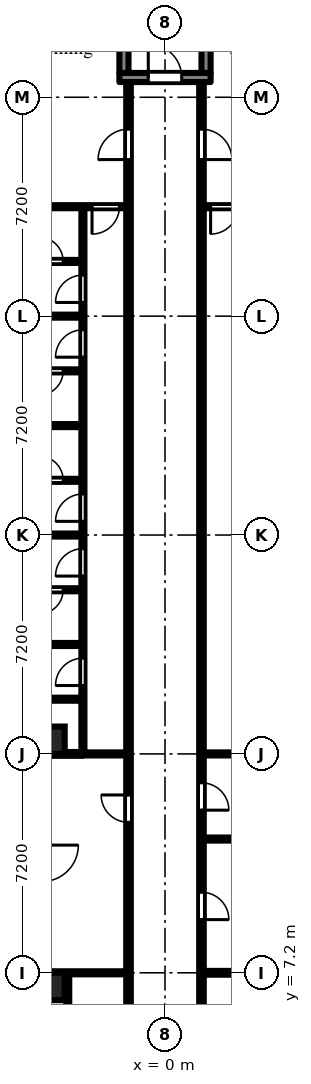
"""IFC4 building model, lengths in metres.
Left out: names, types, materials, properties, quantities, classifications, styles, units other than length and angle.
Written with IfcOpenShell. Run it as: python <this file> out.ifc"""

import sys

from ifc_helpers import new_model, si_unit, direction, frame, frame_2d, origin, origin_2d, place, context, subcontext, project, spatial, rectangle, extrude, element, fill, save


model = new_model("IFC4")
c1 = context("Model", 3, precision=1e-05, world=origin(), true_north=direction((0.0, 1.0)))
c2 = subcontext(c1, "Body", "Model", "MODEL_VIEW")
j1 = project(units=[si_unit("LENGTHUNIT", "METRE"), si_unit("PLANEANGLEUNIT", "RADIAN")], contexts=[c1])
p1 = place(None, origin())
s1 = spatial("IfcSite", under=j1, at=p1, CompositionType="ELEMENT")
p2 = place(p1, origin())
s2 = spatial("IfcBuilding", under=s1, at=p2, CompositionType="ELEMENT")
p3 = place(p2, frame((0.0, 0.0, 11.7)))
s3 = spatial("IfcBuildingStorey", under=s2, at=p3, CompositionType="ELEMENT", Elevation=11.7)
for number, where, z_axis, x_axis in (
    (1, (-3.75, 6.75, 0.0), (0.0, 0.0, 1.0), (1.0, 0.0, 0.0)),
    (2, (-3.75, 14.85, 0.0), (0.0, 0.0, 1.0), (1.0, 0.0, 0.0)),
):
    element("IfcColumn", number, at=place(p3, frame(where, z_axis=z_axis, x_axis=x_axis)), inside=s3, PredefinedType="COLUMN", context=c2, shape_type="SweptSolid", body=[
        extrude(rectangle(XDim=0.9, YDim=0.9, at=origin_2d()), origin(), (0.0, 0.0, 1.0), 3.0),
    ])
p4 = place(p3, frame((-1.5, 36.65, 0.0), z_axis=(0.0, 0.0, 1.0), x_axis=(1.0, 0.0, 0.0)))
e3 = element("IfcWall", 3, at=p4, inside=s3, PredefinedType="SHEAR", context=c2, shape_type="SweptSolid", body=[
    extrude(rectangle(XDim=3.0, YDim=0.3, at=frame_2d((1.5, 0.0))), origin(), (0.0, 0.0, 1.0), 2.575),
])
p5 = place(p4, frame((0.95, 0.0, 0.0)))
e4 = element("IfcOpeningElement", 4, at=p5, cuts=e3, PredefinedType="OPENING", context=c2, shape_type="SweptSolid", body=[
    extrude(rectangle(XDim=1.1, YDim=2.1, at=frame_2d((0.55, 1.05))), frame((0.0, 0.16, 0.0), z_axis=(0.0, -1.0, 0.0), x_axis=(1.0, 0.0, 0.0)), (0.0, 0.0, 1.0), 0.32),
])
for number, where, z_axis, x_axis in (
    (5, (-1.35, 36.8, 0.0), (0.0, 0.0, 1.0), (0.0, 1.0, 0.0)),
    (6, (1.35, 36.8, 0.0), (0.0, 0.0, 1.0), (0.0, 1.0, 0.0)),
):
    element("IfcWall", number, at=place(p3, frame(where, z_axis=z_axis, x_axis=x_axis)), inside=s3, PredefinedType="SHEAR", context=c2, shape_type="SweptSolid", body=[
        extrude(rectangle(XDim=5.8, YDim=0.3, at=frame_2d((2.9, 0.0))), origin(), (0.0, 0.0, 1.0), 2.575),
    ])
for number, where, z_axis, x_axis in (
    (7, (-6.9, 18.0, 0.0), (0.0, 0.0, 1.0), (1.0, 0.0, 0.0)),
    (8, (-6.9, 21.6, 0.0), (0.0, 0.0, 1.0), (1.0, 0.0, 0.0)),
    (9, (-6.9, 25.2, 0.0), (0.0, 0.0, 1.0), (1.0, 0.0, 0.0)),
    (10, (-6.9, 28.8, 0.0), (0.0, 0.0, 1.0), (1.0, 0.0, 0.0)),
):
    element("IfcWall", number, at=place(p3, frame(where, z_axis=z_axis, x_axis=x_axis)), inside=s3, PredefinedType="PARTITIONING", context=c2, shape_type="SweptSolid", body=[
        extrude(rectangle(XDim=4.15, YDim=0.1, at=frame_2d((2.075, 0.0))), origin(), (0.0, 0.0, 1.0), 2.575),
    ])
p6 = place(p3, frame((-6.9, 32.4, 0.0), z_axis=(0.0, 0.0, 1.0), x_axis=(1.0, 0.0, 0.0)))
e11 = element("IfcWall", 11, at=p6, inside=s3, PredefinedType="PARTITIONING", context=c2, shape_type="SweptSolid", body=[
    extrude(rectangle(XDim=5.625, YDim=0.1, at=frame_2d((2.812, 0.0))), origin(), (0.0, 0.0, 1.0), 2.575),
])
p7 = place(p6, frame((4.5, 0.0, 0.0)))
e12 = element("IfcOpeningElement", 12, at=p7, cuts=e11, PredefinedType="OPENING", context=c2, shape_type="SweptSolid", body=[
    extrude(rectangle(XDim=0.9, YDim=2.1, at=frame_2d((0.45, 1.05))), frame((0.0, 0.06, 0.0), z_axis=(0.0, -1.0, 0.0), x_axis=(1.0, 0.0, 0.0)), (0.0, 0.0, 1.0), 0.12),
])
p8 = place(p3, frame((-4.75, 16.2, 0.0), z_axis=(0.0, 0.0, 1.0), x_axis=(1.0, 0.0, 0.0)))
e13 = element("IfcWall", 13, at=p8, inside=s3, PredefinedType="PARTITIONING", context=c2, shape_type="SweptSolid", body=[
    extrude(rectangle(XDim=2.0, YDim=0.1, at=frame_2d((1.0, 0.0))), origin(), (0.0, 0.0, 1.0), 2.575),
])
p9 = place(p3, frame((-4.75, 19.8, 0.0), z_axis=(0.0, 0.0, 1.0), x_axis=(1.0, 0.0, 0.0)))
e14 = element("IfcWall", 14, at=p9, inside=s3, PredefinedType="PARTITIONING", context=c2, shape_type="SweptSolid", body=[
    extrude(rectangle(XDim=2.0, YDim=0.1, at=frame_2d((1.0, 0.0))), origin(), (0.0, 0.0, 1.0), 2.575),
])
p10 = place(p9, frame((0.6, 0.0, 0.0)))
e15 = element("IfcOpeningElement", 15, at=p10, cuts=e14, PredefinedType="OPENING", context=c2, shape_type="SweptSolid", body=[
    extrude(rectangle(XDim=0.8, YDim=2.1, at=frame_2d((0.4, 1.05))), frame((0.0, 0.06, 0.0), z_axis=(0.0, -1.0, 0.0), x_axis=(1.0, 0.0, 0.0)), (0.0, 0.0, 1.0), 0.12),
])
p11 = place(p3, frame((-4.75, 23.4, 0.0), z_axis=(0.0, 0.0, 1.0), x_axis=(1.0, 0.0, 0.0)))
e16 = element("IfcWall", 16, at=p11, inside=s3, PredefinedType="PARTITIONING", context=c2, shape_type="SweptSolid", body=[
    extrude(rectangle(XDim=2.0, YDim=0.1, at=frame_2d((1.0, 0.0))), origin(), (0.0, 0.0, 1.0), 2.575),
])
p12 = place(p11, frame((0.6, 0.0, 0.0)))
e17 = element("IfcOpeningElement", 17, at=p12, cuts=e16, PredefinedType="OPENING", context=c2, shape_type="SweptSolid", body=[
    extrude(rectangle(XDim=0.8, YDim=2.1, at=frame_2d((0.4, 1.05))), frame((0.0, 0.06, 0.0), z_axis=(0.0, -1.0, 0.0), x_axis=(1.0, 0.0, 0.0)), (0.0, 0.0, 1.0), 0.12),
])
p13 = place(p3, frame((-4.75, 27.0, 0.0), z_axis=(0.0, 0.0, 1.0), x_axis=(1.0, 0.0, 0.0)))
e18 = element("IfcWall", 18, at=p13, inside=s3, PredefinedType="PARTITIONING", context=c2, shape_type="SweptSolid", body=[
    extrude(rectangle(XDim=2.0, YDim=0.1, at=frame_2d((1.0, 0.0))), origin(), (0.0, 0.0, 1.0), 2.575),
])
p14 = place(p13, frame((0.6, 0.0, 0.0)))
e19 = element("IfcOpeningElement", 19, at=p14, cuts=e18, PredefinedType="OPENING", context=c2, shape_type="SweptSolid", body=[
    extrude(rectangle(XDim=0.8, YDim=2.1, at=frame_2d((0.4, 1.05))), frame((0.0, 0.06, 0.0), z_axis=(0.0, -1.0, 0.0), x_axis=(1.0, 0.0, 0.0)), (0.0, 0.0, 1.0), 0.12),
])
p15 = place(p3, frame((-4.75, 30.6, 0.0), z_axis=(0.0, 0.0, 1.0), x_axis=(1.0, 0.0, 0.0)))
e20 = element("IfcWall", 20, at=p15, inside=s3, PredefinedType="PARTITIONING", context=c2, shape_type="SweptSolid", body=[
    extrude(rectangle(XDim=2.0, YDim=0.1, at=frame_2d((1.0, 0.0))), origin(), (0.0, 0.0, 1.0), 2.575),
])
p16 = place(p15, frame((0.6, 0.0, 0.0)))
e21 = element("IfcOpeningElement", 21, at=p16, cuts=e20, PredefinedType="OPENING", context=c2, shape_type="SweptSolid", body=[
    extrude(rectangle(XDim=0.8, YDim=2.1, at=frame_2d((0.4, 1.05))), frame((0.0, 0.06, 0.0), z_axis=(0.0, -1.0, 0.0), x_axis=(1.0, 0.0, 0.0)), (0.0, 0.0, 1.0), 0.12),
])
p17 = place(p3, frame((-3.9, 7.2, 0.0), z_axis=(0.0, 0.0, 1.0), x_axis=(1.0, 0.0, 0.0)))
e22 = element("IfcWall", 22, at=p17, inside=s3, PredefinedType="PARTITIONING", context=c2, shape_type="SweptSolid", body=[
    extrude(rectangle(XDim=2.625, YDim=0.1, at=frame_2d((1.312, 0.0))), origin(), (0.0, 0.0, 1.0), 2.575),
])
p18 = place(p3, frame((-3.9, 14.4, 0.0), z_axis=(0.0, 0.0, 1.0), x_axis=(1.0, 0.0, 0.0)))
e23 = element("IfcWall", 23, at=p18, inside=s3, PredefinedType="PARTITIONING", context=c2, shape_type="SweptSolid", body=[
    extrude(rectangle(XDim=1.2, YDim=0.125, at=frame_2d((0.6, 0.0))), origin(), (0.0, 0.0, 1.0), 2.575),
])
p19 = place(p3, frame((-3.2, 1.275, 0.0), z_axis=(0.0, 0.0, 1.0), x_axis=(0.0, 1.0, 0.0)))
e24 = element("IfcWall", 24, at=p19, inside=s3, PredefinedType="PARTITIONING", context=c2, shape_type="SweptSolid", body=[
    extrude(rectangle(XDim=5.875, YDim=0.1, at=frame_2d((2.938, 0.0))), origin(), (0.0, 0.0, 1.0), 2.575),
])
p20 = place(p3, frame((-2.7, 14.462, 0.0), z_axis=(0.0, 0.0, 1.0), x_axis=(0.0, 1.0, 0.0)))
e25 = element("IfcWall", 25, at=p20, inside=s3, PredefinedType="PARTITIONING", context=c2, shape_type="SweptSolid", body=[
    extrude(rectangle(XDim=17.888, YDim=0.1, at=frame_2d((8.944, 0.0))), origin(), (0.0, 0.0, 1.0), 2.575),
])
p21 = place(p20, frame((2.188, 0.0, 0.0)))
e26 = element("IfcOpeningElement", 26, at=p21, cuts=e25, PredefinedType="OPENING", context=c2, shape_type="SweptSolid", body=[
    extrude(rectangle(XDim=0.9, YDim=2.1, at=frame_2d((0.45, 1.05))), frame((0.0, 0.06, 0.0), z_axis=(0.0, -1.0, 0.0), x_axis=(1.0, 0.0, 0.0)), (0.0, 0.0, 1.0), 0.12),
])
p22 = place(p20, frame((5.788, 0.0, 0.0)))
e27 = element("IfcOpeningElement", 27, at=p22, cuts=e25, PredefinedType="OPENING", context=c2, shape_type="SweptSolid", body=[
    extrude(rectangle(XDim=0.9, YDim=2.1, at=frame_2d((0.45, 1.05))), frame((0.0, 0.06, 0.0), z_axis=(0.0, -1.0, 0.0), x_axis=(1.0, 0.0, 0.0)), (0.0, 0.0, 1.0), 0.12),
])
p23 = place(p20, frame((7.587, 0.0, 0.0)))
e28 = element("IfcOpeningElement", 28, at=p23, cuts=e25, PredefinedType="OPENING", context=c2, shape_type="SweptSolid", body=[
    extrude(rectangle(XDim=0.9, YDim=2.1, at=frame_2d((0.45, 1.05))), frame((0.0, 0.06, 0.0), z_axis=(0.0, -1.0, 0.0), x_axis=(1.0, 0.0, 0.0)), (0.0, 0.0, 1.0), 0.12),
])
p24 = place(p20, frame((12.988, 0.0, 0.0)))
e29 = element("IfcOpeningElement", 29, at=p24, cuts=e25, PredefinedType="OPENING", context=c2, shape_type="SweptSolid", body=[
    extrude(rectangle(XDim=0.9, YDim=2.1, at=frame_2d((0.45, 1.05))), frame((0.0, 0.06, 0.0), z_axis=(0.0, -1.0, 0.0), x_axis=(1.0, 0.0, 0.0)), (0.0, 0.0, 1.0), 0.12),
])
p25 = place(p20, frame((14.788, 0.0, 0.0)))
e30 = element("IfcOpeningElement", 30, at=p25, cuts=e25, PredefinedType="OPENING", context=c2, shape_type="SweptSolid", body=[
    extrude(rectangle(XDim=0.9, YDim=2.1, at=frame_2d((0.45, 1.05))), frame((0.0, 0.06, 0.0), z_axis=(0.0, -1.0, 0.0), x_axis=(1.0, 0.0, 0.0)), (0.0, 0.0, 1.0), 0.12),
])
p26 = place(p3, frame((-2.7, 14.4, 0.0), z_axis=(0.0, 0.0, 1.0), x_axis=(1.0, 0.0, 0.0)))
e31 = element("IfcWall", 31, at=p26, inside=s3, PredefinedType="PARTITIONING", context=c2, shape_type="SweptSolid", body=[
    extrude(rectangle(XDim=1.425, YDim=0.1, at=frame_2d((0.712, 0.0))), origin(), (0.0, 0.0, 1.0), 2.575),
])
p27 = place(p3, frame((-1.2, 1.125, 0.0), z_axis=(0.0, 0.0, 1.0), x_axis=(0.0, 1.0, 0.0)))
e32 = element("IfcWall", 32, at=p27, inside=s3, PredefinedType="PARTITIONING", context=c2, shape_type="SweptSolid", body=[
    extrude(rectangle(XDim=35.375, YDim=0.15, at=frame_2d((17.688, 0.0))), origin(), (0.0, 0.0, 1.0), 2.575),
])
p28 = place(p27, frame((2.625, 0.0, 0.0)))
e33 = element("IfcOpeningElement", 33, at=p28, cuts=e32, PredefinedType="OPENING", context=c2, shape_type="SweptSolid", body=[
    extrude(rectangle(XDim=0.9, YDim=2.1, at=frame_2d((0.45, 1.05))), frame((0.0, 0.085, 0.0), z_axis=(0.0, -1.0, 0.0), x_axis=(1.0, 0.0, 0.0)), (0.0, 0.0, 1.0), 0.17),
])
p29 = place(p27, frame((11.025, 0.0, 0.0)))
e34 = element("IfcOpeningElement", 34, at=p29, cuts=e32, PredefinedType="OPENING", context=c2, shape_type="SweptSolid", body=[
    extrude(rectangle(XDim=0.9, YDim=2.1, at=frame_2d((0.45, 1.05))), frame((0.0, 0.085, 0.0), z_axis=(0.0, -1.0, 0.0), x_axis=(1.0, 0.0, 0.0)), (0.0, 0.0, 1.0), 0.17),
])
p30 = place(p27, frame((32.825, 0.0, 0.0)))
e35 = element("IfcOpeningElement", 35, at=p30, cuts=e32, PredefinedType="OPENING", context=c2, shape_type="SweptSolid", body=[
    extrude(rectangle(XDim=1.0, YDim=2.1, at=frame_2d((0.5, 1.05))), frame((0.0, 0.085, 0.0), z_axis=(0.0, -1.0, 0.0), x_axis=(1.0, 0.0, 0.0)), (0.0, 0.0, 1.0), 0.17),
])
p31 = place(p3, frame((1.2, 1.125, 0.0), z_axis=(0.0, 0.0, 1.0), x_axis=(0.0, 1.0, 0.0)))
e36 = element("IfcWall", 36, at=p31, inside=s3, PredefinedType="PARTITIONING", context=c2, shape_type="SweptSolid", body=[
    extrude(rectangle(XDim=35.375, YDim=0.15, at=frame_2d((17.688, 0.0))), origin(), (0.0, 0.0, 1.0), 2.575),
])
p32 = place(p31, frame((2.625, 0.0, 0.0)))
e37 = element("IfcOpeningElement", 37, at=p32, cuts=e36, PredefinedType="OPENING", context=c2, shape_type="SweptSolid", body=[
    extrude(rectangle(XDim=0.9, YDim=2.1, at=frame_2d((0.45, 1.05))), frame((0.0, 0.085, 0.0), z_axis=(0.0, -1.0, 0.0), x_axis=(1.0, 0.0, 0.0)), (0.0, 0.0, 1.0), 0.17),
])
p33 = place(p31, frame((11.425, 0.0, 0.0)))
e38 = element("IfcOpeningElement", 38, at=p33, cuts=e36, PredefinedType="OPENING", context=c2, shape_type="SweptSolid", body=[
    extrude(rectangle(XDim=0.9, YDim=2.1, at=frame_2d((0.45, 1.05))), frame((0.0, 0.085, 0.0), z_axis=(0.0, -1.0, 0.0), x_axis=(1.0, 0.0, 0.0)), (0.0, 0.0, 1.0), 0.17),
])
p34 = place(p31, frame((7.825, 0.0, 0.0)))
e39 = element("IfcOpeningElement", 39, at=p34, cuts=e36, PredefinedType="OPENING", context=c2, shape_type="SweptSolid", body=[
    extrude(rectangle(XDim=0.9, YDim=2.1, at=frame_2d((0.45, 1.05))), frame((0.0, 0.085, 0.0), z_axis=(0.0, -1.0, 0.0), x_axis=(1.0, 0.0, 0.0)), (0.0, 0.0, 1.0), 0.17),
])
p35 = place(p31, frame((32.825, 0.0, 0.0)))
e40 = element("IfcOpeningElement", 40, at=p35, cuts=e36, PredefinedType="OPENING", context=c2, shape_type="SweptSolid", body=[
    extrude(rectangle(XDim=1.0, YDim=2.1, at=frame_2d((0.5, 1.05))), frame((0.0, 0.085, 0.0), z_axis=(0.0, -1.0, 0.0), x_axis=(1.0, 0.0, 0.0)), (0.0, 0.0, 1.0), 0.17),
])
p36 = place(p3, frame((1.275, 7.2, 0.0), z_axis=(0.0, 0.0, 1.0), x_axis=(1.0, 0.0, 0.0)))
e41 = element("IfcWall", 41, at=p36, inside=s3, PredefinedType="PARTITIONING", context=c2, shape_type="SweptSolid", body=[
    extrude(rectangle(XDim=2.625, YDim=0.125, at=frame_2d((1.312, 0.0))), origin(), (0.0, 0.0, 1.0), 2.575),
])
p37 = place(p3, frame((1.275, 11.6, 0.0), z_axis=(0.0, 0.0, 1.0), x_axis=(1.0, 0.0, 0.0)))
e42 = element("IfcWall", 42, at=p37, inside=s3, PredefinedType="PARTITIONING", context=c2, shape_type="SweptSolid", body=[
    extrude(rectangle(XDim=2.625, YDim=0.1, at=frame_2d((1.312, 0.0))), origin(), (0.0, 0.0, 1.0), 2.575),
])
p38 = place(p3, frame((1.275, 14.4, 0.0), z_axis=(0.0, 0.0, 1.0), x_axis=(1.0, 0.0, 0.0)))
e43 = element("IfcWall", 43, at=p38, inside=s3, PredefinedType="PARTITIONING", context=c2, shape_type="SweptSolid", body=[
    extrude(rectangle(XDim=1.425, YDim=0.1, at=frame_2d((0.712, 0.0))), origin(), (0.0, 0.0, 1.0), 2.575),
])
p39 = place(p3, frame((1.275, 32.4, 0.0), z_axis=(0.0, 0.0, 1.0), x_axis=(1.0, 0.0, 0.0)))
e44 = element("IfcWall", 44, at=p39, inside=s3, PredefinedType="PARTITIONING", context=c2, shape_type="SweptSolid", body=[
    extrude(rectangle(XDim=5.625, YDim=0.1, at=frame_2d((2.812, 0.0))), origin(), (0.0, 0.0, 1.0), 2.575),
])
p40 = place(p39, frame((0.225, 0.0, 0.0)))
e45 = element("IfcOpeningElement", 45, at=p40, cuts=e44, PredefinedType="OPENING", context=c2, shape_type="SweptSolid", body=[
    extrude(rectangle(XDim=0.9, YDim=2.1, at=frame_2d((0.45, 1.05))), frame((0.0, 0.06, 0.0), z_axis=(0.0, -1.0, 0.0), x_axis=(1.0, 0.0, 0.0)), (0.0, 0.0, 1.0), 0.12),
])
p41 = place(p5, origin())
e46 = element("IfcDoor", 46, at=p41, inside=s3, OperationType="SINGLE_SWING_LEFT", PredefinedType="DOOR", context=c2, shape_type="SweptSolid", body=[
    extrude(rectangle(XDim=1.1, YDim=2.1, at=frame_2d((0.55, 1.05))), frame((0.0, 0.025, 0.0), z_axis=(0.0, -1.0, 0.0), x_axis=(1.0, 0.0, 0.0)), (0.0, 0.0, 1.0), 0.05),
])
fill(e4, e46)
p42 = place(p29, origin())
e47 = element("IfcDoor", 47, at=p42, inside=s3, OperationType="SINGLE_SWING_RIGHT", PredefinedType="DOOR", context=c2, shape_type="SweptSolid", body=[
    extrude(rectangle(XDim=0.9, YDim=2.1, at=frame_2d((0.45, 1.05))), frame((0.0, 0.025, 0.0), z_axis=(0.0, -1.0, 0.0), x_axis=(1.0, 0.0, 0.0)), (0.0, 0.0, 1.0), 0.05),
])
fill(e34, e47)
p43 = place(p30, origin())
e48 = element("IfcDoor", 48, at=p43, inside=s3, OperationType="SINGLE_SWING_LEFT", PredefinedType="DOOR", context=c2, shape_type="SweptSolid", body=[
    extrude(rectangle(XDim=1.0, YDim=2.1, at=frame_2d((0.5, 1.05))), frame((0.0, 0.025, 0.0), z_axis=(0.0, -1.0, 0.0), x_axis=(1.0, 0.0, 0.0)), (0.0, 0.0, 1.0), 0.05),
])
fill(e35, e48)
p44 = place(p21, origin())
e49 = element("IfcDoor", 49, at=p44, inside=s3, OperationType="SINGLE_SWING_LEFT", PredefinedType="DOOR", context=c2, shape_type="SweptSolid", body=[
    extrude(rectangle(XDim=0.9, YDim=2.1, at=frame_2d((0.45, 1.05))), frame((0.0, 0.025, 0.0), z_axis=(0.0, -1.0, 0.0), x_axis=(1.0, 0.0, 0.0)), (0.0, 0.0, 1.0), 0.05),
])
fill(e26, e49)
p45 = place(p22, origin())
e50 = element("IfcDoor", 50, at=p45, inside=s3, OperationType="SINGLE_SWING_LEFT", PredefinedType="DOOR", context=c2, shape_type="SweptSolid", body=[
    extrude(rectangle(XDim=0.9, YDim=2.1, at=frame_2d((0.45, 1.05))), frame((0.0, 0.025, 0.0), z_axis=(0.0, -1.0, 0.0), x_axis=(1.0, 0.0, 0.0)), (0.0, 0.0, 1.0), 0.05),
])
fill(e27, e50)
p46 = place(p23, origin())
e51 = element("IfcDoor", 51, at=p46, inside=s3, OperationType="SINGLE_SWING_LEFT", PredefinedType="DOOR", context=c2, shape_type="SweptSolid", body=[
    extrude(rectangle(XDim=0.9, YDim=2.1, at=frame_2d((0.45, 1.05))), frame((0.0, 0.025, 0.0), z_axis=(0.0, -1.0, 0.0), x_axis=(1.0, 0.0, 0.0)), (0.0, 0.0, 1.0), 0.05),
])
fill(e28, e51)
p47 = place(p24, origin())
e52 = element("IfcDoor", 52, at=p47, inside=s3, OperationType="SINGLE_SWING_LEFT", PredefinedType="DOOR", context=c2, shape_type="SweptSolid", body=[
    extrude(rectangle(XDim=0.9, YDim=2.1, at=frame_2d((0.45, 1.05))), frame((0.0, 0.025, 0.0), z_axis=(0.0, -1.0, 0.0), x_axis=(1.0, 0.0, 0.0)), (0.0, 0.0, 1.0), 0.05),
])
fill(e29, e52)
p48 = place(p25, origin())
e53 = element("IfcDoor", 53, at=p48, inside=s3, OperationType="SINGLE_SWING_LEFT", PredefinedType="DOOR", context=c2, shape_type="SweptSolid", body=[
    extrude(rectangle(XDim=0.9, YDim=2.1, at=frame_2d((0.45, 1.05))), frame((0.0, 0.025, 0.0), z_axis=(0.0, -1.0, 0.0), x_axis=(1.0, 0.0, 0.0)), (0.0, 0.0, 1.0), 0.05),
])
fill(e30, e53)
p49 = place(p7, frame((0.9, 0.0, 0.0), z_axis=(0.0, 0.0, 1.0), x_axis=(-1.0, 0.0, 0.0)))
e54 = element("IfcDoor", 54, at=p49, inside=s3, OperationType="SINGLE_SWING_RIGHT", PredefinedType="DOOR", context=c2, shape_type="SweptSolid", body=[
    extrude(rectangle(XDim=0.9, YDim=2.1, at=frame_2d((0.45, 1.05))), frame((0.0, 0.025, 0.0), z_axis=(0.0, -1.0, 0.0), x_axis=(1.0, 0.0, 0.0)), (0.0, 0.0, 1.0), 0.05),
])
fill(e12, e54)
p50 = place(p10, frame((0.8, 0.0, 0.0), z_axis=(0.0, 0.0, 1.0), x_axis=(-1.0, 0.0, 0.0)))
e55 = element("IfcDoor", 55, at=p50, inside=s3, OperationType="SINGLE_SWING_RIGHT", PredefinedType="DOOR", context=c2, shape_type="SweptSolid", body=[
    extrude(rectangle(XDim=0.8, YDim=2.1, at=frame_2d((0.4, 1.05))), frame((0.0, 0.025, 0.0), z_axis=(0.0, -1.0, 0.0), x_axis=(1.0, 0.0, 0.0)), (0.0, 0.0, 1.0), 0.05),
])
fill(e15, e55)
p51 = place(p12, origin())
e56 = element("IfcDoor", 56, at=p51, inside=s3, OperationType="SINGLE_SWING_LEFT", PredefinedType="DOOR", context=c2, shape_type="SweptSolid", body=[
    extrude(rectangle(XDim=0.8, YDim=2.1, at=frame_2d((0.4, 1.05))), frame((0.0, 0.025, 0.0), z_axis=(0.0, -1.0, 0.0), x_axis=(1.0, 0.0, 0.0)), (0.0, 0.0, 1.0), 0.05),
])
fill(e17, e56)
p52 = place(p14, frame((0.8, 0.0, 0.0), z_axis=(0.0, 0.0, 1.0), x_axis=(-1.0, 0.0, 0.0)))
e57 = element("IfcDoor", 57, at=p52, inside=s3, OperationType="SINGLE_SWING_RIGHT", PredefinedType="DOOR", context=c2, shape_type="SweptSolid", body=[
    extrude(rectangle(XDim=0.8, YDim=2.1, at=frame_2d((0.4, 1.05))), frame((0.0, 0.025, 0.0), z_axis=(0.0, -1.0, 0.0), x_axis=(1.0, 0.0, 0.0)), (0.0, 0.0, 1.0), 0.05),
])
fill(e19, e57)
p53 = place(p16, origin())
e58 = element("IfcDoor", 58, at=p53, inside=s3, OperationType="SINGLE_SWING_LEFT", PredefinedType="DOOR", context=c2, shape_type="SweptSolid", body=[
    extrude(rectangle(XDim=0.8, YDim=2.1, at=frame_2d((0.4, 1.05))), frame((0.0, 0.025, 0.0), z_axis=(0.0, -1.0, 0.0), x_axis=(1.0, 0.0, 0.0)), (0.0, 0.0, 1.0), 0.05),
])
fill(e21, e58)
p54 = place(p33, frame((0.9, 0.0, 0.0), z_axis=(0.0, 0.0, 1.0), x_axis=(-1.0, 0.0, 0.0)))
e59 = element("IfcDoor", 59, at=p54, inside=s3, OperationType="SINGLE_SWING_RIGHT", PredefinedType="DOOR", context=c2, shape_type="SweptSolid", body=[
    extrude(rectangle(XDim=0.9, YDim=2.1, at=frame_2d((0.45, 1.05))), frame((0.0, 0.025, 0.0), z_axis=(0.0, -1.0, 0.0), x_axis=(1.0, 0.0, 0.0)), (0.0, 0.0, 1.0), 0.05),
])
fill(e38, e59)
p55 = place(p34, frame((0.9, 0.0, 0.0), z_axis=(0.0, 0.0, 1.0), x_axis=(-1.0, 0.0, 0.0)))
e60 = element("IfcDoor", 60, at=p55, inside=s3, OperationType="SINGLE_SWING_RIGHT", PredefinedType="DOOR", context=c2, shape_type="SweptSolid", body=[
    extrude(rectangle(XDim=0.9, YDim=2.1, at=frame_2d((0.45, 1.05))), frame((0.0, 0.025, 0.0), z_axis=(0.0, -1.0, 0.0), x_axis=(1.0, 0.0, 0.0)), (0.0, 0.0, 1.0), 0.05),
])
fill(e39, e60)
p56 = place(p35, frame((1.0, 0.0, 0.0), z_axis=(0.0, 0.0, 1.0), x_axis=(-1.0, 0.0, 0.0)))
e61 = element("IfcDoor", 61, at=p56, inside=s3, OperationType="SINGLE_SWING_RIGHT", PredefinedType="DOOR", context=c2, shape_type="SweptSolid", body=[
    extrude(rectangle(XDim=1.0, YDim=2.1, at=frame_2d((0.5, 1.05))), frame((0.0, 0.025, 0.0), z_axis=(0.0, -1.0, 0.0), x_axis=(1.0, 0.0, 0.0)), (0.0, 0.0, 1.0), 0.05),
])
fill(e40, e61)
p57 = place(p40, frame((0.9, 0.0, 0.0), z_axis=(0.0, 0.0, 1.0), x_axis=(-1.0, 0.0, 0.0)))
e62 = element("IfcDoor", 62, at=p57, inside=s3, OperationType="SINGLE_SWING_RIGHT", PredefinedType="DOOR", context=c2, shape_type="SweptSolid", body=[
    extrude(rectangle(XDim=0.9, YDim=2.1, at=frame_2d((0.45, 1.05))), frame((0.0, 0.025, 0.0), z_axis=(0.0, -1.0, 0.0), x_axis=(1.0, 0.0, 0.0)), (0.0, 0.0, 1.0), 0.05),
])
fill(e45, e62)
save(model, sys.argv[1])
